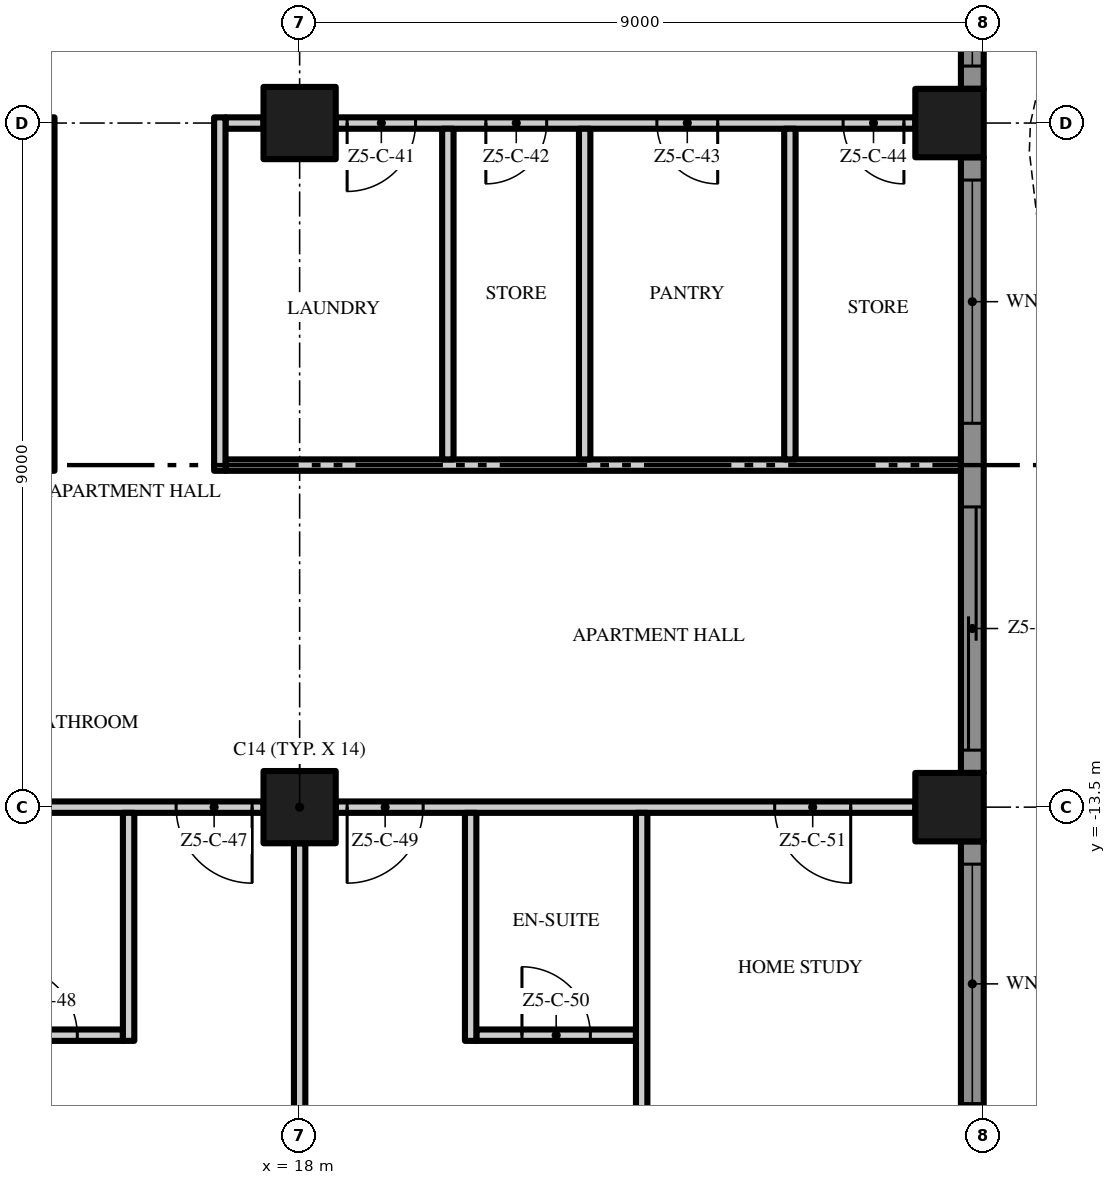
"""IFC4 building model, lengths in metres.
Left out: names, types, materials, properties, quantities, classifications, styles, units other than length and angle.
Written with IfcOpenShell. Run it as: python <this file> out.ifc"""

import sys

from ifc_helpers import new_model, si_unit, direction, frame, frame_2d, origin, origin_2d, place, context, subcontext, project, spatial, polyline, rectangle, outline, extrude, element, fill, save


model = new_model("IFC4")
c1 = context("Model", 3, precision=1e-05, world=origin(), true_north=direction((0.0, 1.0)))
c2 = subcontext(c1, "Body", "Model", "MODEL_VIEW")
j1 = project(units=[si_unit("LENGTHUNIT", "METRE"), si_unit("PLANEANGLEUNIT", "RADIAN")], contexts=[c1])
p1 = place(None, origin())
s1 = spatial("IfcSite", under=j1, at=p1, CompositionType="ELEMENT")
p2 = place(p1, origin())
s2 = spatial("IfcBuilding", under=s1, at=p2, CompositionType="ELEMENT")
p3 = place(p2, frame((0.0, 0.0, 269.2)))
s3 = spatial("IfcBuildingStorey", under=s2, at=p3, CompositionType="ELEMENT", Elevation=269.2)
for number, where, z_axis, x_axis in (
    (1, (18.0, -13.5, 0.0), (0.0, 0.0, 1.0), (1.0, 0.0, 0.0)),
    (2, (18.0, -4.5, 0.0), (0.0, 0.0, 1.0), (1.0, 0.0, 0.0)),
):
    element("IfcColumn", number, at=place(p3, frame(where, z_axis=z_axis, x_axis=x_axis)), inside=s3, PredefinedType="COLUMN", context=c2, shape_type="SweptSolid", body=[
        extrude(rectangle(XDim=0.95, YDim=0.95, at=origin_2d()), origin(), (0.0, 0.0, 1.0), 3.5),
    ])
for number, where, z_axis, x_axis in (
    (3, (26.55, -13.5, 0.0), (0.0, 0.0, 1.0), (1.0, 0.0, 0.0)),
    (4, (26.55, -4.5, 0.0), (0.0, 0.0, 1.0), (1.0, 0.0, 0.0)),
):
    element("IfcColumn", number, at=place(p3, frame(where, z_axis=z_axis, x_axis=x_axis)), inside=s3, PredefinedType="COLUMN", context=c2, shape_type="SweptSolid", body=[
        extrude(rectangle(XDim=0.9, YDim=0.9, at=origin_2d()), origin(), (0.0, 0.0, 1.0), 3.5),
    ])
p4 = place(p3, frame((26.85, -13.95, 0.0), z_axis=(0.0, 0.0, 1.0), x_axis=(0.0, -1.0, 0.0)))
e5 = element("IfcWall", 5, at=p4, inside=s3, PredefinedType="SOLIDWALL", context=c2, shape_type="SweptSolid", body=[
    extrude(rectangle(XDim=3.75, YDim=0.3, at=frame_2d((1.875, 0.0))), origin(), (0.0, 0.0, 1.0), 3.5),
])
p5 = place(p4, frame((0.3, 0.0, 0.45)))
e6 = element("IfcOpeningElement", 6, at=p5, cuts=e5, PredefinedType="OPENING", context=c2, shape_type="SweptSolid", body=[
    extrude(rectangle(XDim=3.15, YDim=2.65, at=frame_2d((1.575, 1.325))), frame((0.0, 0.16, 0.0), z_axis=(0.0, -1.0, 0.0), x_axis=(1.0, 0.0, 0.0)), (0.0, 0.0, 1.0), 0.32),
])
p6 = place(p3, frame((26.85, -4.95, 0.0), z_axis=(0.0, 0.0, 1.0), x_axis=(0.0, -1.0, 0.0)))
e7 = element("IfcWall", 7, at=p6, inside=s3, PredefinedType="SOLIDWALL", context=c2, shape_type="SweptSolid", body=[
    extrude(rectangle(XDim=8.1, YDim=0.3, at=frame_2d((4.05, 0.0))), origin(), (0.0, 0.0, 1.0), 3.5),
])
p7 = place(p6, frame((4.6, 0.0, 0.0)))
e8 = element("IfcOpeningElement", 8, at=p7, cuts=e7, PredefinedType="OPENING", context=c2, shape_type="SweptSolid", body=[
    extrude(rectangle(XDim=3.2, YDim=2.4, at=frame_2d((1.6, 1.2))), frame((0.0, 0.16, 0.0), z_axis=(0.0, -1.0, 0.0), x_axis=(1.0, 0.0, 0.0)), (0.0, 0.0, 1.0), 0.32),
])
p8 = place(p6, frame((0.3, 0.0, 0.45)))
e9 = element("IfcOpeningElement", 9, at=p8, cuts=e7, PredefinedType="OPENING", context=c2, shape_type="SweptSolid", body=[
    extrude(rectangle(XDim=3.2, YDim=2.65, at=frame_2d((1.6, 1.325))), frame((0.0, 0.16, 0.0), z_axis=(0.0, -1.0, 0.0), x_axis=(1.0, 0.0, 0.0)), (0.0, 0.0, 1.0), 0.32),
])
p9 = place(p3, frame((26.85, 4.05, 0.0), z_axis=(0.0, 0.0, 1.0), x_axis=(0.0, -1.0, 0.0)))
e10 = element("IfcWall", 10, at=p9, inside=s3, PredefinedType="SOLIDWALL", context=c2, shape_type="SweptSolid", body=[
    extrude(rectangle(XDim=8.1, YDim=0.3, at=frame_2d((4.05, 0.0))), origin(), (0.0, 0.0, 1.0), 3.5),
])
p10 = place(p9, frame((4.6, 0.0, 0.45)))
e11 = element("IfcOpeningElement", 11, at=p10, cuts=e10, PredefinedType="OPENING", context=c2, shape_type="SweptSolid", body=[
    extrude(rectangle(XDim=3.2, YDim=2.65, at=frame_2d((1.6, 1.325))), frame((0.0, 0.16, 0.0), z_axis=(0.0, -1.0, 0.0), x_axis=(1.0, 0.0, 0.0)), (0.0, 0.0, 1.0), 0.32),
])
p11 = place(p9, frame((0.3, 0.0, 0.0)))
e12 = element("IfcOpeningElement", 12, at=p11, cuts=e10, PredefinedType="OPENING", context=c2, shape_type="SweptSolid", body=[
    extrude(rectangle(XDim=3.2, YDim=2.4, at=frame_2d((1.6, 1.2))), frame((0.0, 0.16, 0.0), z_axis=(0.0, -1.0, 0.0), x_axis=(1.0, 0.0, 0.0)), (0.0, 0.0, 1.0), 0.32),
])
p12 = place(p3, origin())
e13 = element("IfcWall", 13, at=p12, inside=s3, PredefinedType="USERDEFINED", context=c2, shape_type="SweptSolid", body=[
    extrude(outline(polyline([(27.951, -18.0), (28.612, -16.5), (29.345, -15.0), (29.869, -13.5), (30.0, -12.375), (29.985, -12.0), (29.649, -10.5), (28.988, -9.0), (28.255, -7.5), (27.731, -6.0), (27.6, -4.875), (27.615, -4.5), (27.951, -3.0), (28.612, -1.5), (29.345, 0.0), (29.869, 1.5), (30.0, 2.625), (29.985, 3.0), (29.649, 4.5), (28.988, 6.0), (28.255, 7.5), (27.731, 9.0), (27.6, 10.125), (27.615, 10.5), (27.951, 12.0), (28.612, 13.5), (29.345, 15.0), (29.869, 16.5), (30.0, 17.625), (29.985, 18.0), (29.735, 17.99), (29.749, 17.635), (29.624, 16.556), (29.114, 15.096), (28.385, 13.605), (27.713, 12.079), (27.366, 10.533), (27.349, 10.115), (27.486, 8.944), (28.024, 7.404), (28.761, 5.895), (29.41, 4.421), (29.736, 2.967), (29.749, 2.635), (29.624, 1.556), (29.114, 0.096), (28.385, -1.395), (27.713, -2.921), (27.366, -4.467), (27.349, -4.885), (27.486, -6.056), (28.024, -7.596), (28.761, -9.105), (29.41, -10.579), (29.736, -12.033), (29.749, -12.365), (29.624, -13.444), (29.114, -14.904), (28.385, -16.395), (27.723, -17.899), (27.951, -18.0)])), origin(), (0.0, 0.0, 1.0), 0.9),
])
p13 = place(p3, frame((13.575, -16.5, 0.0), z_axis=(0.0, 0.0, 1.0), x_axis=(1.0, 0.0, 0.0)))
e14 = element("IfcWall", 14, at=p13, inside=s3, PredefinedType="PARTITIONING", context=c2, shape_type="SweptSolid", body=[
    extrude(rectangle(XDim=2.1, YDim=0.15, at=frame_2d((1.05, 0.0))), origin(), (0.0, 0.0, 1.0), 3.5),
])
p14 = place(p13, frame((0.6, 0.0, 0.0)))
e15 = element("IfcOpeningElement", 15, at=p14, cuts=e14, PredefinedType="OPENING", context=c2, shape_type="SweptSolid", body=[
    extrude(rectangle(XDim=0.9, YDim=2.1, at=frame_2d((0.45, 1.05))), frame((0.0, 0.085, 0.0), z_axis=(0.0, -1.0, 0.0), x_axis=(1.0, 0.0, 0.0)), (0.0, 0.0, 1.0), 0.17),
])
p15 = place(p3, frame((20.325, -16.5, 0.0), z_axis=(0.0, 0.0, 1.0), x_axis=(1.0, 0.0, 0.0)))
e16 = element("IfcWall", 16, at=p15, inside=s3, PredefinedType="PARTITIONING", context=c2, shape_type="SweptSolid", body=[
    extrude(rectangle(XDim=2.1, YDim=0.15, at=frame_2d((1.05, 0.0))), origin(), (0.0, 0.0, 1.0), 3.5),
])
p16 = place(p15, frame((0.6, 0.0, 0.0)))
e17 = element("IfcOpeningElement", 17, at=p16, cuts=e16, PredefinedType="OPENING", context=c2, shape_type="SweptSolid", body=[
    extrude(rectangle(XDim=0.9, YDim=2.1, at=frame_2d((0.45, 1.05))), frame((0.0, 0.085, 0.0), z_axis=(0.0, -1.0, 0.0), x_axis=(1.0, 0.0, 0.0)), (0.0, 0.0, 1.0), 0.17),
])
p17 = place(p3, frame((17.525, -13.5, 0.0), z_axis=(0.0, 0.0, 1.0), x_axis=(-1.0, 0.0, 0.0)))
e18 = element("IfcWall", 18, at=p17, inside=s3, PredefinedType="PARTITIONING", context=c2, shape_type="SweptSolid", body=[
    extrude(rectangle(XDim=8.05, YDim=0.15, at=frame_2d((4.025, 0.0))), origin(), (0.0, 0.0, 1.0), 3.5),
])
p18 = place(p17, frame((6.1, 0.0, 0.0)))
e19 = element("IfcOpeningElement", 19, at=p18, cuts=e18, PredefinedType="OPENING", context=c2, shape_type="SweptSolid", body=[
    extrude(rectangle(XDim=1.8, YDim=2.4, at=frame_2d((0.9, 1.2))), frame((0.0, 0.085, 0.0), z_axis=(0.0, -1.0, 0.0), x_axis=(1.0, 0.0, 0.0)), (0.0, 0.0, 1.0), 0.17),
])
p19 = place(p17, frame((0.15, 0.0, 0.0)))
e20 = element("IfcOpeningElement", 20, at=p19, cuts=e18, PredefinedType="OPENING", context=c2, shape_type="SweptSolid", body=[
    extrude(rectangle(XDim=1.0, YDim=2.4, at=frame_2d((0.5, 1.2))), frame((0.0, 0.085, 0.0), z_axis=(0.0, -1.0, 0.0), x_axis=(1.0, 0.0, 0.0)), (0.0, 0.0, 1.0), 0.17),
])
p20 = place(p3, frame((26.1, -13.5, 0.0), z_axis=(0.0, 0.0, 1.0), x_axis=(-1.0, 0.0, 0.0)))
e21 = element("IfcWall", 21, at=p20, inside=s3, PredefinedType="PARTITIONING", context=c2, shape_type="SweptSolid", body=[
    extrude(rectangle(XDim=7.625, YDim=0.15, at=frame_2d((3.812, 0.0))), origin(), (0.0, 0.0, 1.0), 3.5),
])
p21 = place(p20, frame((6.475, 0.0, 0.0)))
e22 = element("IfcOpeningElement", 22, at=p21, cuts=e21, PredefinedType="OPENING", context=c2, shape_type="SweptSolid", body=[
    extrude(rectangle(XDim=1.0, YDim=2.4, at=frame_2d((0.5, 1.2))), frame((0.0, 0.085, 0.0), z_axis=(0.0, -1.0, 0.0), x_axis=(1.0, 0.0, 0.0)), (0.0, 0.0, 1.0), 0.17),
])
p22 = place(p20, frame((0.85, 0.0, 0.0)))
e23 = element("IfcOpeningElement", 23, at=p22, cuts=e21, PredefinedType="OPENING", context=c2, shape_type="SweptSolid", body=[
    extrude(rectangle(XDim=1.0, YDim=2.4, at=frame_2d((0.5, 1.2))), frame((0.0, 0.085, 0.0), z_axis=(0.0, -1.0, 0.0), x_axis=(1.0, 0.0, 0.0)), (0.0, 0.0, 1.0), 0.17),
])
p23 = place(p3, frame((17.025, -9.0, 0.0), z_axis=(0.0, 0.0, 1.0), x_axis=(1.0, 0.0, 0.0)))
e24 = element("IfcWall", 24, at=p23, inside=s3, PredefinedType="PARTITIONING", context=c2, shape_type="SweptSolid", body=[
    extrude(rectangle(XDim=9.675, YDim=0.15, at=frame_2d((4.838, 0.0))), origin(), (0.0, 0.0, 1.0), 3.5),
])
p24 = place(p3, frame((17.025, -4.5, 0.0), z_axis=(0.0, 0.0, 1.0), x_axis=(1.0, 0.0, 0.0)))
e25 = element("IfcWall", 25, at=p24, inside=s3, PredefinedType="PARTITIONING", context=c2, shape_type="SweptSolid", body=[
    extrude(rectangle(XDim=0.5, YDim=0.15, at=frame_2d((0.25, 0.0))), origin(), (0.0, 0.0, 1.0), 3.5),
])
p25 = place(p3, frame((26.1, -4.5, 0.0), z_axis=(0.0, 0.0, 1.0), x_axis=(-1.0, 0.0, 0.0)))
e26 = element("IfcWall", 26, at=p25, inside=s3, PredefinedType="PARTITIONING", context=c2, shape_type="SweptSolid", body=[
    extrude(rectangle(XDim=7.625, YDim=0.15, at=frame_2d((3.812, 0.0))), origin(), (0.0, 0.0, 1.0), 3.5),
])
p26 = place(p25, frame((6.575, 0.0, 0.0)))
e27 = element("IfcOpeningElement", 27, at=p26, cuts=e26, PredefinedType="OPENING", context=c2, shape_type="SweptSolid", body=[
    extrude(rectangle(XDim=0.9, YDim=2.1, at=frame_2d((0.45, 1.05))), frame((0.0, 0.085, 0.0), z_axis=(0.0, -1.0, 0.0), x_axis=(1.0, 0.0, 0.0)), (0.0, 0.0, 1.0), 0.17),
])
p27 = place(p25, frame((4.85, 0.0, 0.0)))
e28 = element("IfcOpeningElement", 28, at=p27, cuts=e26, PredefinedType="OPENING", context=c2, shape_type="SweptSolid", body=[
    extrude(rectangle(XDim=0.8, YDim=2.0, at=frame_2d((0.4, 1.0))), frame((0.0, 0.085, 0.0), z_axis=(0.0, -1.0, 0.0), x_axis=(1.0, 0.0, 0.0)), (0.0, 0.0, 1.0), 0.17),
])
p28 = place(p25, frame((2.6, 0.0, 0.0)))
e29 = element("IfcOpeningElement", 29, at=p28, cuts=e26, PredefinedType="OPENING", context=c2, shape_type="SweptSolid", body=[
    extrude(rectangle(XDim=0.8, YDim=2.0, at=frame_2d((0.4, 1.0))), frame((0.0, 0.085, 0.0), z_axis=(0.0, -1.0, 0.0), x_axis=(1.0, 0.0, 0.0)), (0.0, 0.0, 1.0), 0.17),
])
p29 = place(p25, frame((0.15, 0.0, 0.0)))
e30 = element("IfcOpeningElement", 30, at=p29, cuts=e26, PredefinedType="OPENING", context=c2, shape_type="SweptSolid", body=[
    extrude(rectangle(XDim=0.8, YDim=2.0, at=frame_2d((0.4, 1.0))), frame((0.0, 0.085, 0.0), z_axis=(0.0, -1.0, 0.0), x_axis=(1.0, 0.0, 0.0)), (0.0, 0.0, 1.0), 0.17),
])
p30 = place(p3, frame((14.7, -9.075, 0.0), z_axis=(0.0, 0.0, 1.0), x_axis=(0.0, 1.0, 0.0)))
e31 = element("IfcWall", 31, at=p30, inside=s3, PredefinedType="PARTITIONING", context=c2, shape_type="SweptSolid", body=[
    extrude(rectangle(XDim=4.65, YDim=0.15, at=frame_2d((2.325, 0.0))), origin(), (0.0, 0.0, 1.0), 3.5),
])
p31 = place(p30, frame((1.875, 0.0, 0.0)))
e32 = element("IfcOpeningElement", 32, at=p31, cuts=e31, PredefinedType="OPENING", context=c2, shape_type="SweptSolid", body=[
    extrude(rectangle(XDim=0.9, YDim=2.1, at=frame_2d((0.45, 1.05))), frame((0.0, 0.085, 0.0), z_axis=(0.0, -1.0, 0.0), x_axis=(1.0, 0.0, 0.0)), (0.0, 0.0, 1.0), 0.17),
])
p32 = place(p3, frame((15.75, -16.575, 0.0), z_axis=(0.0, 0.0, 1.0), x_axis=(0.0, 1.0, 0.0)))
e33 = element("IfcWall", 33, at=p32, inside=s3, PredefinedType="PARTITIONING", context=c2, shape_type="SweptSolid", body=[
    extrude(rectangle(XDim=3.0, YDim=0.15, at=frame_2d((1.5, 0.0))), origin(), (0.0, 0.0, 1.0), 3.5),
])
p33 = place(p3, frame((16.95, -9.075, 0.0), z_axis=(0.0, 0.0, 1.0), x_axis=(0.0, 1.0, 0.0)))
e34 = element("IfcWall", 34, at=p33, inside=s3, PredefinedType="PARTITIONING", context=c2, shape_type="SweptSolid", body=[
    extrude(rectangle(XDim=4.65, YDim=0.15, at=frame_2d((2.325, 0.0))), origin(), (0.0, 0.0, 1.0), 3.5),
])
p34 = place(p3, frame((18.0, -21.6, 0.0), z_axis=(0.0, 0.0, 1.0), x_axis=(0.0, 1.0, 0.0)))
e35 = element("IfcWall", 35, at=p34, inside=s3, PredefinedType="PARTITIONING", context=c2, shape_type="SweptSolid", body=[
    extrude(rectangle(XDim=7.625, YDim=0.15, at=frame_2d((3.812, 0.0))), origin(), (0.0, 0.0, 1.0), 3.5),
])
p35 = place(p3, frame((19.95, -8.925, 0.0), z_axis=(0.0, 0.0, 1.0), x_axis=(0.0, 1.0, 0.0)))
e36 = element("IfcWall", 36, at=p35, inside=s3, PredefinedType="PARTITIONING", context=c2, shape_type="SweptSolid", body=[
    extrude(rectangle(XDim=4.35, YDim=0.15, at=frame_2d((2.175, 0.0))), origin(), (0.0, 0.0, 1.0), 3.5),
])
p36 = place(p3, frame((20.25, -16.575, 0.0), z_axis=(0.0, 0.0, 1.0), x_axis=(0.0, 1.0, 0.0)))
e37 = element("IfcWall", 37, at=p36, inside=s3, PredefinedType="PARTITIONING", context=c2, shape_type="SweptSolid", body=[
    extrude(rectangle(XDim=3.0, YDim=0.15, at=frame_2d((1.5, 0.0))), origin(), (0.0, 0.0, 1.0), 3.5),
])
p37 = place(p3, frame((21.75, -8.925, 0.0), z_axis=(0.0, 0.0, 1.0), x_axis=(0.0, 1.0, 0.0)))
e38 = element("IfcWall", 38, at=p37, inside=s3, PredefinedType="PARTITIONING", context=c2, shape_type="SweptSolid", body=[
    extrude(rectangle(XDim=4.35, YDim=0.15, at=frame_2d((2.175, 0.0))), origin(), (0.0, 0.0, 1.0), 3.5),
])
p38 = place(p3, frame((22.5, -17.55, 0.0), z_axis=(0.0, 0.0, 1.0), x_axis=(0.0, 1.0, 0.0)))
e39 = element("IfcWall", 39, at=p38, inside=s3, PredefinedType="PARTITIONING", context=c2, shape_type="SweptSolid", body=[
    extrude(rectangle(XDim=3.975, YDim=0.15, at=frame_2d((1.988, 0.0))), origin(), (0.0, 0.0, 1.0), 3.5),
])
p39 = place(p3, frame((24.45, -8.925, 0.0), z_axis=(0.0, 0.0, 1.0), x_axis=(0.0, 1.0, 0.0)))
e40 = element("IfcWall", 40, at=p39, inside=s3, PredefinedType="PARTITIONING", context=c2, shape_type="SweptSolid", body=[
    extrude(rectangle(XDim=4.35, YDim=0.15, at=frame_2d((2.175, 0.0))), origin(), (0.0, 0.0, 1.0), 3.5),
])
p40 = place(p5, origin())
e41 = element("IfcWindow", 41, at=p40, inside=s3, PartitioningType="SINGLE_PANEL", PredefinedType="WINDOW", context=c2, shape_type="SweptSolid", body=[
    extrude(rectangle(XDim=3.15, YDim=2.65, at=frame_2d((1.575, 1.325))), frame((0.0, 0.03, 0.0), z_axis=(0.0, -1.0, 0.0), x_axis=(1.0, 0.0, 0.0)), (0.0, 0.0, 1.0), 0.06),
])
fill(e6, e41)
p41 = place(p7, origin())
e42 = element("IfcDoor", 42, at=p41, inside=s3, OperationType="SINGLE_SWING_LEFT", PredefinedType="DOOR", context=c2, shape_type="SweptSolid", body=[
    extrude(rectangle(XDim=3.2, YDim=2.4, at=frame_2d((1.6, 1.2))), frame((0.0, 0.025, 0.0), z_axis=(0.0, -1.0, 0.0), x_axis=(1.0, 0.0, 0.0)), (0.0, 0.0, 1.0), 0.05),
])
fill(e8, e42)
p42 = place(p8, origin())
e43 = element("IfcWindow", 43, at=p42, inside=s3, PartitioningType="SINGLE_PANEL", PredefinedType="WINDOW", context=c2, shape_type="SweptSolid", body=[
    extrude(rectangle(XDim=3.2, YDim=2.65, at=frame_2d((1.6, 1.325))), frame((0.0, 0.03, 0.0), z_axis=(0.0, -1.0, 0.0), x_axis=(1.0, 0.0, 0.0)), (0.0, 0.0, 1.0), 0.06),
])
fill(e9, e43)
p43 = place(p10, origin())
e44 = element("IfcWindow", 44, at=p43, inside=s3, PartitioningType="SINGLE_PANEL", PredefinedType="WINDOW", context=c2, shape_type="SweptSolid", body=[
    extrude(rectangle(XDim=3.2, YDim=2.65, at=frame_2d((1.6, 1.325))), frame((0.0, 0.03, 0.0), z_axis=(0.0, -1.0, 0.0), x_axis=(1.0, 0.0, 0.0)), (0.0, 0.0, 1.0), 0.06),
])
fill(e11, e44)
p44 = place(p26, origin())
e45 = element("IfcDoor", 45, at=p44, inside=s3, OperationType="SINGLE_SWING_RIGHT", PredefinedType="DOOR", context=c2, shape_type="SweptSolid", body=[
    extrude(rectangle(XDim=0.9, YDim=2.1, at=frame_2d((0.45, 1.05))), frame((0.0, 0.025, 0.0), z_axis=(0.0, -1.0, 0.0), x_axis=(1.0, 0.0, 0.0)), (0.0, 0.0, 1.0), 0.05),
])
fill(e27, e45)
p45 = place(p27, origin())
e46 = element("IfcDoor", 46, at=p45, inside=s3, OperationType="SINGLE_SWING_RIGHT", PredefinedType="DOOR", context=c2, shape_type="SweptSolid", body=[
    extrude(rectangle(XDim=0.8, YDim=2.0, at=frame_2d((0.4, 1.0))), frame((0.0, 0.025, 0.0), z_axis=(0.0, -1.0, 0.0), x_axis=(1.0, 0.0, 0.0)), (0.0, 0.0, 1.0), 0.05),
])
fill(e28, e46)
p46 = place(p28, origin())
e47 = element("IfcDoor", 47, at=p46, inside=s3, OperationType="SINGLE_SWING_LEFT", PredefinedType="DOOR", context=c2, shape_type="SweptSolid", body=[
    extrude(rectangle(XDim=0.8, YDim=2.0, at=frame_2d((0.4, 1.0))), frame((0.0, 0.025, 0.0), z_axis=(0.0, -1.0, 0.0), x_axis=(1.0, 0.0, 0.0)), (0.0, 0.0, 1.0), 0.05),
])
fill(e29, e47)
p47 = place(p29, origin())
e48 = element("IfcDoor", 48, at=p47, inside=s3, OperationType="SINGLE_SWING_LEFT", PredefinedType="DOOR", context=c2, shape_type="SweptSolid", body=[
    extrude(rectangle(XDim=0.8, YDim=2.0, at=frame_2d((0.4, 1.0))), frame((0.0, 0.025, 0.0), z_axis=(0.0, -1.0, 0.0), x_axis=(1.0, 0.0, 0.0)), (0.0, 0.0, 1.0), 0.05),
])
fill(e30, e48)
p48 = place(p19, origin())
e49 = element("IfcDoor", 49, at=p48, inside=s3, OperationType="SINGLE_SWING_LEFT", PredefinedType="DOOR", context=c2, shape_type="SweptSolid", body=[
    extrude(rectangle(XDim=1.0, YDim=2.4, at=frame_2d((0.5, 1.2))), frame((0.0, 0.025, 0.0), z_axis=(0.0, -1.0, 0.0), x_axis=(1.0, 0.0, 0.0)), (0.0, 0.0, 1.0), 0.05),
])
fill(e20, e49)
p49 = place(p14, origin())
e50 = element("IfcDoor", 50, at=p49, inside=s3, OperationType="SINGLE_SWING_LEFT", PredefinedType="DOOR", context=c2, shape_type="SweptSolid", body=[
    extrude(rectangle(XDim=0.9, YDim=2.1, at=frame_2d((0.45, 1.05))), frame((0.0, 0.025, 0.0), z_axis=(0.0, -1.0, 0.0), x_axis=(1.0, 0.0, 0.0)), (0.0, 0.0, 1.0), 0.05),
])
fill(e15, e50)
p50 = place(p21, origin())
e51 = element("IfcDoor", 51, at=p50, inside=s3, OperationType="SINGLE_SWING_RIGHT", PredefinedType="DOOR", context=c2, shape_type="SweptSolid", body=[
    extrude(rectangle(XDim=1.0, YDim=2.4, at=frame_2d((0.5, 1.2))), frame((0.0, 0.025, 0.0), z_axis=(0.0, -1.0, 0.0), x_axis=(1.0, 0.0, 0.0)), (0.0, 0.0, 1.0), 0.05),
])
fill(e22, e51)
p51 = place(p16, origin())
e52 = element("IfcDoor", 52, at=p51, inside=s3, OperationType="SINGLE_SWING_LEFT", PredefinedType="DOOR", context=c2, shape_type="SweptSolid", body=[
    extrude(rectangle(XDim=0.9, YDim=2.1, at=frame_2d((0.45, 1.05))), frame((0.0, 0.025, 0.0), z_axis=(0.0, -1.0, 0.0), x_axis=(1.0, 0.0, 0.0)), (0.0, 0.0, 1.0), 0.05),
])
fill(e17, e52)
p52 = place(p22, origin())
e53 = element("IfcDoor", 53, at=p52, inside=s3, OperationType="SINGLE_SWING_LEFT", PredefinedType="DOOR", context=c2, shape_type="SweptSolid", body=[
    extrude(rectangle(XDim=1.0, YDim=2.4, at=frame_2d((0.5, 1.2))), frame((0.0, 0.025, 0.0), z_axis=(0.0, -1.0, 0.0), x_axis=(1.0, 0.0, 0.0)), (0.0, 0.0, 1.0), 0.05),
])
fill(e23, e53)
save(model, sys.argv[1])
